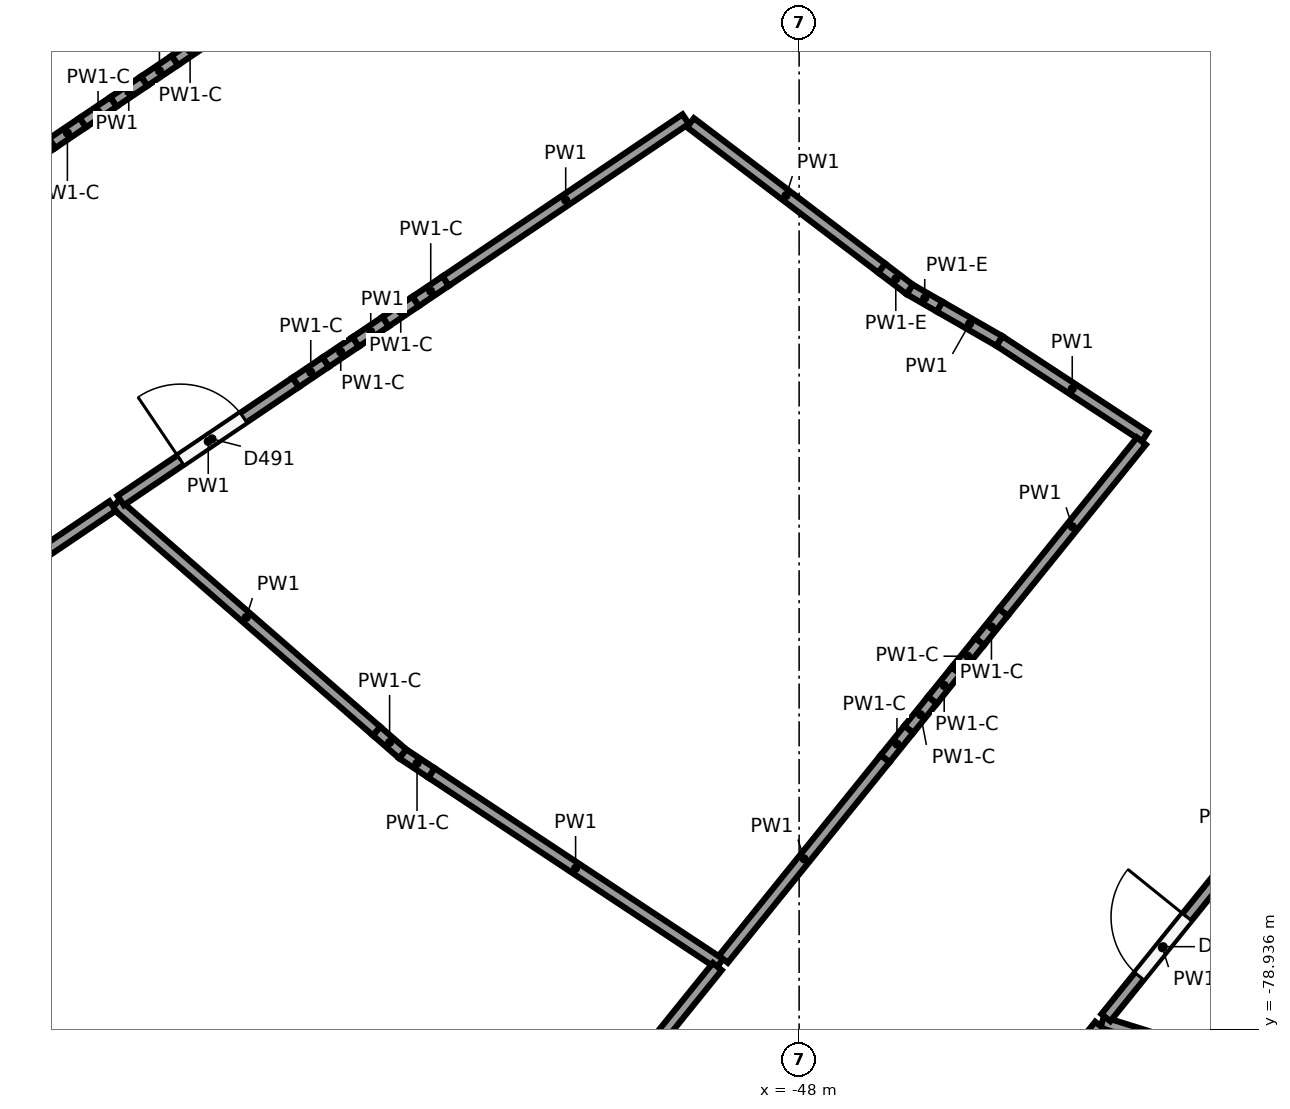
"""IFC4 building model, lengths in metres.
Left out: names, types, materials, properties, quantities, classifications, styles, units other than length and angle.
Written with IfcOpenShell. Run it as: python <this file> out.ifc"""

import sys

from ifc_helpers import new_model, si_unit, direction, frame, frame_2d, origin, origin_2d, place, context, subcontext, project, spatial, rectangle, circle, extrude, element, fill, save


model = new_model("IFC4")
c1 = context("Model", 3, precision=1e-05, world=origin(), true_north=direction((0.0, 1.0)))
c2 = subcontext(c1, "Body", "Model", "MODEL_VIEW")
j1 = project(units=[si_unit("LENGTHUNIT", "METRE"), si_unit("PLANEANGLEUNIT", "RADIAN")], contexts=[c1])
p1 = place(None, origin())
s1 = spatial("IfcSite", under=j1, at=p1, CompositionType="ELEMENT")
p2 = place(p1, origin())
s2 = spatial("IfcBuilding", under=s1, at=p2, CompositionType="ELEMENT")
p3 = place(p2, frame((0.0, 0.0, -4.0)))
s3 = spatial("IfcBuildingStorey", under=s2, at=p3, CompositionType="ELEMENT", Elevation=-4.0)
p4 = place(p3, frame((-54.82, -67.902, -0.4), z_axis=(0.0, 0.0, 1.0), x_axis=(1.0, 0.0, 0.0)))
e1 = element("IfcColumn", 1, at=p4, inside=s3, PredefinedType="COLUMN", context=c2, shape_type="SweptSolid", body=[
    extrude(circle(Radius=0.45, at=origin_2d()), origin(), (0.0, 0.0, 1.0), 4.4),
])
p5 = place(p3, frame((-55.94, -68.658, -0.4), z_axis=(0.0, 0.0, 1.0), x_axis=(1.0, 0.0, 0.0)))
e2 = element("IfcColumn", 2, at=p5, inside=s3, PredefinedType="COLUMN", context=c2, shape_type="SweptSolid", body=[
    extrude(circle(Radius=0.4, at=origin_2d()), origin(), (0.0, 0.0, 1.0), 4.4),
])
for number, where, z_axis, x_axis in (
    (3, (-43.569, -66.479, -0.4), (0.0, 0.0, 1.0), (1.0, 0.0, 0.0)),
    (4, (-45.777, -68.5, -0.4), (0.0, 0.0, 1.0), (1.0, 0.0, 0.0)),
    (5, (-49.518, -71.925, -0.4), (0.0, 0.0, 1.0), (1.0, 0.0, 0.0)),
):
    element("IfcColumn", number, at=place(p3, frame(where, z_axis=z_axis, x_axis=x_axis)), inside=s3, PredefinedType="COLUMN", context=c2, shape_type="SweptSolid", body=[
        extrude(circle(Radius=0.45, at=origin_2d()), origin(), (0.0, 0.0, 1.0), 4.4),
    ])
p6 = place(p3, frame((-50.572, -72.889, -0.4), z_axis=(0.0, 0.0, 1.0), x_axis=(1.0, 0.0, 0.0)))
e6 = element("IfcColumn", 6, at=p6, inside=s3, PredefinedType="COLUMN", context=c2, shape_type="SweptSolid", body=[
    extrude(circle(Radius=0.4, at=origin_2d()), origin(), (0.0, 0.0, 1.0), 4.4),
])
p7 = place(p3, frame((-56.915, -78.696, -0.4), z_axis=(0.0, 0.0, 1.0), x_axis=(1.0, 0.0, 0.0)))
e7 = element("IfcColumn", 7, at=p7, inside=s3, PredefinedType="COLUMN", context=c2, shape_type="SweptSolid", body=[
    extrude(circle(Radius=0.45, at=origin_2d()), origin(), (0.0, 0.0, 1.0), 4.4),
])
p8 = place(p3, frame((-43.43, -74.617, -0.4), z_axis=(0.0, 0.0, 1.0), x_axis=(1.0, 0.0, 0.0)))
e8 = element("IfcColumn", 8, at=p8, inside=s3, PredefinedType="COLUMN", context=c2, shape_type="SweptSolid", body=[
    extrude(circle(Radius=0.4, at=origin_2d()), origin(), (0.0, 0.0, 1.0), 4.4),
])
p9 = place(p3, frame((-44.39, -75.806, -0.4), z_axis=(0.0, 0.0, 1.0), x_axis=(1.0, 0.0, 0.0)))
e9 = element("IfcColumn", 9, at=p9, inside=s3, PredefinedType="COLUMN", context=c2, shape_type="SweptSolid", body=[
    extrude(circle(Radius=0.35, at=origin_2d()), origin(), (0.0, 0.0, 1.0), 4.4),
])
p10 = place(p3, frame((-55.811, -65.917, 0.0), z_axis=(0.0, 0.0, 1.0), x_axis=(-0.828953242646, -0.559317907372, 0.0)))
e10 = element("IfcWall", 10, at=p10, inside=s3, PredefinedType="PARTITIONING", context=c2, shape_type="SweptSolid", body=[
    extrude(rectangle(XDim=0.487, YDim=0.15, at=frame_2d((0.244, 0.0))), origin(), (0.0, 0.0, 1.0), 2.7),
])
p11 = place(p3, frame((-56.215, -66.189, 0.0), z_axis=(0.0, 0.0, 1.0), x_axis=(-0.828796357195, -0.559550353678, 0.0)))
e11 = element("IfcWall", 11, at=p11, inside=s3, PredefinedType="PARTITIONING", context=c2, shape_type="SweptSolid", body=[
    extrude(rectangle(XDim=0.487, YDim=0.15, at=frame_2d((0.243, 0.0))), origin(), (0.0, 0.0, 1.0), 2.7),
])
p12 = place(p3, frame((-56.618, -66.461, 0.0), z_axis=(0.0, 0.0, 1.0), x_axis=(-0.828953242646, -0.559317907372, 0.0)))
e12 = element("IfcWall", 12, at=p12, inside=s3, PredefinedType="PARTITIONING", context=c2, shape_type="SweptSolid", body=[
    extrude(rectangle(XDim=0.487, YDim=0.15, at=frame_2d((0.244, 0.0))), origin(), (0.0, 0.0, 1.0), 3.6),
])
p13 = place(p3, frame((-57.022, -66.734, 0.0), z_axis=(0.0, 0.0, 1.0), x_axis=(-0.828563830016, -0.559894614717, 0.0)))
e13 = element("IfcWall", 13, at=p13, inside=s3, PredefinedType="PARTITIONING", context=c2, shape_type="SweptSolid", body=[
    extrude(rectangle(XDim=0.487, YDim=0.15, at=frame_2d((0.244, 0.0))), origin(), (0.0, 0.0, 1.0), 2.7),
])
p14 = place(p3, frame((-57.426, -67.007, 0.0), z_axis=(0.0, 0.0, 1.0), x_axis=(-0.828796357195, -0.559550353678, 0.0)))
e14 = element("IfcWall", 14, at=p14, inside=s3, PredefinedType="PARTITIONING", context=c2, shape_type="SweptSolid", body=[
    extrude(rectangle(XDim=0.487, YDim=0.15, at=frame_2d((0.243, 0.0))), origin(), (0.0, 0.0, 1.0), 2.7),
])
p15 = place(p3, frame((-57.829, -67.279, 0.0), z_axis=(0.0, 0.0, 1.0), x_axis=(-0.828841201566, -0.559483925226, 0.0)))
e15 = element("IfcWall", 15, at=p15, inside=s3, PredefinedType="PARTITIONING", context=c2, shape_type="SweptSolid", body=[
    extrude(rectangle(XDim=3.409, YDim=0.15, at=frame_2d((1.705, 0.0))), origin(), (0.0, 0.0, 1.0), 3.6),
])
p16 = place(p3, frame((-49.045, -78.071, 0.0), z_axis=(0.0, 0.0, 1.0), x_axis=(-0.8339449215, 0.551847685421, 0.0)))
e16 = element("IfcWall", 16, at=p16, inside=s3, PredefinedType="PARTITIONING", context=c2, shape_type="SweptSolid", body=[
    extrude(rectangle(XDim=4.548, YDim=0.15, at=frame_2d((2.274, 0.0))), origin(), (0.0, 0.0, 1.0), 3.6),
])
for number, where, z_axis, x_axis in (
    (17, (-52.837, -75.561, 0.0), (0.0, 0.0, 1.0), (-0.834, 0.552, 0.0)),
    (18, (-53.217, -75.31, 0.0), (0.0, 0.0, 1.0), (-0.754, 0.657, 0.0)),
):
    element("IfcWall", number, at=place(p3, frame(where, z_axis=z_axis, x_axis=x_axis)), inside=s3, PredefinedType="PARTITIONING", context=c2, shape_type="SweptSolid", body=[
        extrude(rectangle(XDim=0.455, YDim=0.15, at=frame_2d((0.228, 0.0))), origin(), (0.0, 0.0, 1.0), 2.7),
    ])
p17 = place(p3, frame((-53.56, -75.011, 0.0), z_axis=(0.0, 0.0, 1.0), x_axis=(-0.753891280965, 0.656999190627, 0.0)))
e19 = element("IfcWall", 19, at=p17, inside=s3, PredefinedType="PARTITIONING", context=c2, shape_type="SweptSolid", body=[
    extrude(rectangle(XDim=4.551, YDim=0.15, at=frame_2d((2.275, 0.0))), origin(), (0.0, 0.0, 1.0), 3.6),
])
p18 = place(p3, frame((-56.926, -71.978, 0.0), z_axis=(0.0, 0.0, 1.0), x_axis=(0.828833397724, 0.559495485967, 0.0)))
e20 = element("IfcWall", 20, at=p18, inside=s3, PredefinedType="PARTITIONING", context=c2, shape_type="SweptSolid", body=[
    extrude(rectangle(XDim=2.779, YDim=0.15, at=frame_2d((1.39, 0.0))), origin(), (0.0, 0.0, 1.0), 3.6),
])
p19 = place(p18, frame((0.95, 0.0, 0.0)))
e21 = element("IfcOpeningElement", 21, at=p19, cuts=e20, PredefinedType="OPENING", context=c2, shape_type="SweptSolid", body=[
    extrude(rectangle(XDim=1.0, YDim=2.1, at=frame_2d((0.5, 1.05))), frame((0.0, 0.085, 0.0), z_axis=(0.0, -1.0, 0.0), x_axis=(1.0, 0.0, 0.0)), (0.0, 0.0, 1.0), 0.17),
])
p20 = place(p3, frame((-54.623, -70.423, 0.0), z_axis=(0.0, 0.0, 1.0), x_axis=(0.828801105453, 0.559543320575, 0.0)))
e22 = element("IfcWall", 22, at=p20, inside=s3, PredefinedType="PARTITIONING", context=c2, shape_type="SweptSolid", body=[
    extrude(rectangle(XDim=0.476, YDim=0.15, at=frame_2d((0.238, 0.0))), origin(), (0.0, 0.0, 1.0), 2.7),
])
p21 = place(p3, frame((-54.228, -70.157, 0.0), z_axis=(0.0, 0.0, 1.0), x_axis=(0.828961577554, 0.559305554182, 0.0)))
e23 = element("IfcWall", 23, at=p21, inside=s3, PredefinedType="PARTITIONING", context=c2, shape_type="SweptSolid", body=[
    extrude(rectangle(XDim=0.476, YDim=0.15, at=frame_2d((0.238, 0.0))), origin(), (0.0, 0.0, 1.0), 2.7),
])
p22 = place(p3, frame((-53.833, -69.89, 0.0), z_axis=(0.0, 0.0, 1.0), x_axis=(0.828563254438, 0.559895466489, 0.0)))
e24 = element("IfcWall", 24, at=p22, inside=s3, PredefinedType="PARTITIONING", context=c2, shape_type="SweptSolid", body=[
    extrude(rectangle(XDim=0.476, YDim=0.15, at=frame_2d((0.238, 0.0))), origin(), (0.0, 0.0, 1.0), 3.6),
])
p23 = place(p3, frame((-53.439, -69.624, 0.0), z_axis=(0.0, 0.0, 1.0), x_axis=(0.828961577554, 0.559305554182, 0.0)))
e25 = element("IfcWall", 25, at=p23, inside=s3, PredefinedType="PARTITIONING", context=c2, shape_type="SweptSolid", body=[
    extrude(rectangle(XDim=0.476, YDim=0.15, at=frame_2d((0.238, 0.0))), origin(), (0.0, 0.0, 1.0), 2.7),
])
p24 = place(p3, frame((-53.044, -69.357, 0.0), z_axis=(0.0, 0.0, 1.0), x_axis=(0.828801105453, 0.559543320575, 0.0)))
e26 = element("IfcWall", 26, at=p24, inside=s3, PredefinedType="PARTITIONING", context=c2, shape_type="SweptSolid", body=[
    extrude(rectangle(XDim=0.476, YDim=0.15, at=frame_2d((0.238, 0.0))), origin(), (0.0, 0.0, 1.0), 2.7),
])
p25 = place(p3, frame((-52.65, -69.091, 0.0), z_axis=(0.0, 0.0, 1.0), x_axis=(0.828831583129, 0.559498174088, 0.0)))
e27 = element("IfcWall", 27, at=p25, inside=s3, PredefinedType="PARTITIONING", context=c2, shape_type="SweptSolid", body=[
    extrude(rectangle(XDim=3.809, YDim=0.15, at=frame_2d((1.904, 0.0))), origin(), (0.0, 0.0, 1.0), 3.6),
])
p26 = place(p3, frame((-49.43, -67.008, 0.0), z_axis=(0.0, 0.0, 1.0), x_axis=(0.796072912049, -0.605200725959, 0.0)))
e28 = element("IfcWall", 28, at=p26, inside=s3, PredefinedType="PARTITIONING", context=c2, shape_type="SweptSolid", body=[
    extrude(rectangle(XDim=3.162, YDim=0.15, at=frame_2d((1.581, 0.0))), origin(), (0.0, 0.0, 1.0), 3.6),
])
p27 = place(p3, frame((-46.913, -68.921, 0.0), z_axis=(0.0, 0.0, 1.0), x_axis=(0.796060594094, -0.60521692849, 0.0)))
e29 = element("IfcWall", 29, at=p27, inside=s3, PredefinedType="PARTITIONING", context=c2, shape_type="SweptSolid", body=[
    extrude(rectangle(XDim=0.463, YDim=0.15, at=frame_2d((0.231, 0.0))), origin(), (0.0, 0.0, 1.0), 2.85),
])
p28 = place(p3, frame((-46.544, -69.202, 0.0), z_axis=(0.0, 0.0, 1.0), x_axis=(0.866749327227, -0.498744026281, 0.0)))
e30 = element("IfcWall", 30, at=p28, inside=s3, PredefinedType="PARTITIONING", context=c2, shape_type="SweptSolid", body=[
    extrude(rectangle(XDim=0.454, YDim=0.15, at=frame_2d((0.227, 0.0))), origin(), (0.0, 0.0, 1.0), 2.85),
])
p29 = place(p3, frame((-46.151, -69.428, 0.0), z_axis=(0.0, 0.0, 1.0), x_axis=(0.866915025791, -0.498455953979, 0.0)))
e31 = element("IfcWall", 31, at=p29, inside=s3, PredefinedType="PARTITIONING", context=c2, shape_type="SweptSolid", body=[
    extrude(rectangle(XDim=0.907, YDim=0.15, at=frame_2d((0.454, 0.0))), origin(), (0.0, 0.0, 1.0), 3.6),
])
p30 = place(p3, frame((-45.364, -69.88, 0.0), z_axis=(0.0, 0.0, 1.0), x_axis=(0.836012774971, -0.548709978117, 0.0)))
e32 = element("IfcWall", 32, at=p30, inside=s3, PredefinedType="PARTITIONING", context=c2, shape_type="SweptSolid", body=[
    extrude(rectangle(XDim=2.291, YDim=0.15, at=frame_2d((1.146, 0.0))), origin(), (0.0, 0.0, 1.0), 3.6),
])
p31 = place(p3, frame((-43.496, -71.196, 0.0), z_axis=(0.0, 0.0, 1.0), x_axis=(-0.628052420579, -0.77817103326, 0.0)))
e33 = element("IfcWall", 33, at=p31, inside=s3, PredefinedType="PARTITIONING", context=c2, shape_type="SweptSolid", body=[
    extrude(rectangle(XDim=2.895, YDim=0.15, at=frame_2d((1.447, 0.0))), origin(), (0.0, 0.0, 1.0), 3.6),
])
for number, where, z_axis, x_axis in (
    (34, (-45.314, -73.448, 0.0), (0.0, 0.0, 1.0), (-0.628, -0.778, 0.0)),
    (35, (-45.625, -73.834, 0.0), (0.0, 0.0, 1.0), (-0.628, -0.778, 0.0)),
    (36, (-45.936, -74.219, 0.0), (0.0, 0.0, 1.0), (-0.628, -0.778, 0.0)),
    (37, (-46.247, -74.604, 0.0), (0.0, 0.0, 1.0), (-0.628, -0.778, 0.0)),
):
    element("IfcWall", number, at=place(p3, frame(where, z_axis=z_axis, x_axis=x_axis)), inside=s3, PredefinedType="PARTITIONING", context=c2, shape_type="SweptSolid", body=[
        extrude(rectangle(XDim=0.495, YDim=0.15, at=frame_2d((0.248, 0.0))), origin(), (0.0, 0.0, 1.0), 2.7),
    ])
p32 = place(p3, frame((-46.558, -74.989, 0.0), z_axis=(0.0, 0.0, 1.0), x_axis=(-0.628176414208, -0.778070943187, 0.0)))
e38 = element("IfcWall", 38, at=p32, inside=s3, PredefinedType="PARTITIONING", context=c2, shape_type="SweptSolid", body=[
    extrude(rectangle(XDim=0.495, YDim=0.15, at=frame_2d((0.248, 0.0))), origin(), (0.0, 0.0, 1.0), 2.7),
])
p33 = place(p3, frame((-46.869, -75.375, 0.0), z_axis=(0.0, 0.0, 1.0), x_axis=(-0.628018502996, -0.77819840651, 0.0)))
e39 = element("IfcWall", 39, at=p33, inside=s3, PredefinedType="PARTITIONING", context=c2, shape_type="SweptSolid", body=[
    extrude(rectangle(XDim=3.389, YDim=0.15, at=frame_2d((1.695, 0.0))), origin(), (0.0, 0.0, 1.0), 3.6),
])
p34 = place(p3, frame((-49.076, -78.11, 0.0), z_axis=(0.0, 0.0, 1.0), x_axis=(-0.62801256648, -0.778203197335, 0.0)))
e40 = element("IfcWall", 40, at=p34, inside=s3, PredefinedType="PARTITIONING", context=c2, shape_type="SweptSolid", body=[
    extrude(rectangle(XDim=3.87, YDim=0.15, at=frame_2d((1.935, 0.0))), origin(), (0.0, 0.0, 1.0), 3.6),
])
p35 = place(p3, frame((-60.739, -74.552, 0.0), z_axis=(0.0, 0.0, 1.0), x_axis=(0.8288366496, 0.559490668626, 0.0)))
e41 = element("IfcWall", 41, at=p35, inside=s3, PredefinedType="PARTITIONING", context=c2, shape_type="SweptSolid", body=[
    extrude(rectangle(XDim=4.472, YDim=0.15, at=frame_2d((2.236, 0.0))), origin(), (0.0, 0.0, 1.0), 3.6),
])
p36 = place(p3, frame((-39.907, -80.127, 0.0), z_axis=(0.0, 0.0, 1.0), x_axis=(-0.954509247754, 0.29818131389, 0.0)))
e42 = element("IfcWall", 42, at=p36, inside=s3, PredefinedType="PARTITIONING", context=c2, shape_type="SweptSolid", body=[
    extrude(rectangle(XDim=4.303, YDim=0.15, at=frame_2d((2.152, 0.0))), origin(), (0.0, 0.0, 1.0), 3.6),
])
p37 = place(p3, frame((-43.964, -78.781, 0.0), z_axis=(0.0, 0.0, 1.0), x_axis=(0.628039015817, 0.77818185189, 0.0)))
e43 = element("IfcWall", 43, at=p37, inside=s3, PredefinedType="PARTITIONING", context=c2, shape_type="SweptSolid", body=[
    extrude(rectangle(XDim=2.364, YDim=0.15, at=frame_2d((1.182, 0.0))), origin(), (0.0, 0.0, 1.0), 3.6),
])
p38 = place(p37, frame((0.7, 0.0, 0.0)))
e44 = element("IfcOpeningElement", 44, at=p38, cuts=e43, PredefinedType="OPENING", context=c2, shape_type="SweptSolid", body=[
    extrude(rectangle(XDim=1.0, YDim=2.1, at=frame_2d((0.5, 1.05))), frame((0.0, 0.085, 0.0), z_axis=(0.0, -1.0, 0.0), x_axis=(1.0, 0.0, 0.0)), (0.0, 0.0, 1.0), 0.17),
])
p39 = place(p3, frame((-47.018, -82.566, 0.0), z_axis=(0.0, 0.0, 1.0), x_axis=(0.628029681061, 0.778189385501, 0.0)))
e45 = element("IfcWall", 45, at=p39, inside=s3, PredefinedType="PARTITIONING", context=c2, shape_type="SweptSolid", body=[
    extrude(rectangle(XDim=4.733, YDim=0.15, at=frame_2d((2.366, 0.0))), origin(), (0.0, 0.0, 1.0), 3.6),
])
p40 = place(p19, origin())
e46 = element("IfcDoor", 46, at=p40, inside=s3, OperationType="SINGLE_SWING_LEFT", PredefinedType="DOOR", context=c2, shape_type="SweptSolid", body=[
    extrude(rectangle(XDim=1.0, YDim=2.1, at=frame_2d((0.5, 1.05))), frame((0.0, 0.025, 0.0), z_axis=(0.0, -1.0, 0.0), x_axis=(1.0, 0.0, 0.0)), (0.0, 0.0, 1.0), 0.05),
])
fill(e21, e46)
p41 = place(p38, origin())
e47 = element("IfcDoor", 47, at=p41, inside=s3, OperationType="SINGLE_SWING_RIGHT", PredefinedType="DOOR", context=c2, shape_type="SweptSolid", body=[
    extrude(rectangle(XDim=1.0, YDim=2.1, at=frame_2d((0.5, 1.05))), frame((0.0, 0.025, 0.0), z_axis=(0.0, -1.0, 0.0), x_axis=(1.0, 0.0, 0.0)), (0.0, 0.0, 1.0), 0.05),
])
fill(e44, e47)
save(model, sys.argv[1])
